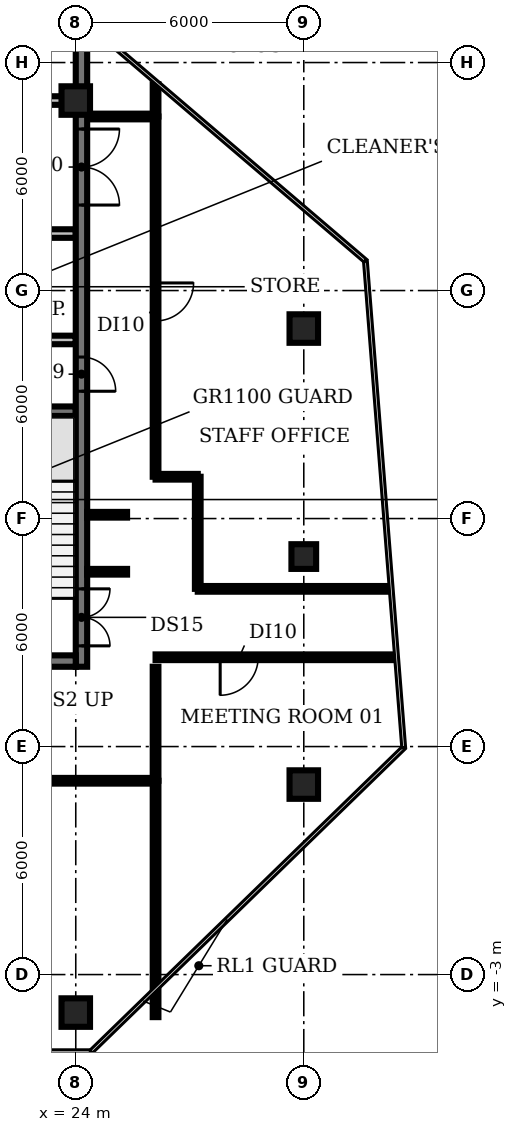
"""IFC4 building model, lengths in metres.
Left out: names, types, materials, properties, quantities, classifications, styles, units other than length and angle.
Written with IfcOpenShell. Run it as: python <this file> out.ifc"""

import sys

from ifc_helpers import new_model, si_unit, direction, frame, frame_2d, origin, origin_2d, place, context, subcontext, project, spatial, rectangle, circle, extrude, element, fill, save


model = new_model("IFC4")
c1 = context("Model", 3, precision=1e-05, world=origin(), true_north=direction((0.0, 1.0)))
c2 = subcontext(c1, "Body", "Model", "MODEL_VIEW")
j1 = project(units=[si_unit("LENGTHUNIT", "METRE"), si_unit("PLANEANGLEUNIT", "RADIAN")], contexts=[c1])
p1 = place(None, origin())
s1 = spatial("IfcSite", under=j1, at=p1, CompositionType="ELEMENT")
p2 = place(p1, origin())
s2 = spatial("IfcBuilding", under=s1, at=p2, CompositionType="ELEMENT")
p3 = place(p2, frame((0.0, 0.0, 314.6)))
s3 = spatial("IfcBuildingStorey", under=s2, at=p3, CompositionType="ELEMENT", Elevation=314.6)
for number, where, z_axis, x_axis in (
    (1, (24.0, -4.0, 0.0), (0.0, 0.0, 1.0), (1.0, 0.0, 0.0)),
    (2, (24.0, 20.0, 0.0), (0.0, 0.0, 1.0), (1.0, 0.0, 0.0)),
    (3, (30.0, 2.0, 0.0), (0.0, 0.0, 1.0), (1.0, 0.0, 0.0)),
):
    element("IfcColumn", number, at=place(p3, frame(where, z_axis=z_axis, x_axis=x_axis)), inside=s3, PredefinedType="COLUMN", context=c2, shape_type="SweptSolid", body=[
        extrude(circle(Radius=0.375, at=origin_2d()), origin(), (0.0, 0.0, 1.0), 3.9),
    ])
p4 = place(p3, frame((30.0, 8.0, 0.0), z_axis=(0.0, 0.0, 1.0), x_axis=(1.0, 0.0, 0.0)))
e4 = element("IfcColumn", 4, at=p4, inside=s3, PredefinedType="COLUMN", context=c2, shape_type="SweptSolid", body=[
    extrude(rectangle(XDim=0.65, YDim=0.65, at=origin_2d()), origin(), (0.0, 0.0, 1.0), 3.9),
])
p5 = place(p3, frame((30.0, 14.0, 0.0), z_axis=(0.0, 0.0, 1.0), x_axis=(1.0, 0.0, 0.0)))
e5 = element("IfcColumn", 5, at=p5, inside=s3, PredefinedType="COLUMN", context=c2, shape_type="SweptSolid", body=[
    extrude(circle(Radius=0.375, at=origin_2d()), origin(), (0.0, 0.0, 1.0), 3.9),
])
p6 = place(p3, frame((20.85, 11.825, 0.0), z_axis=(0.0, 0.0, 1.0), x_axis=(1.0, 0.0, 0.0)))
e6 = element("IfcWall", 6, at=p6, inside=s3, PredefinedType="SHEAR", context=c2, shape_type="SweptSolid", body=[
    extrude(rectangle(XDim=3.15, YDim=0.25, at=frame_2d((1.575, 0.0))), origin(), (0.0, 0.0, 1.0), 3.9),
])
p7 = place(p3, frame((16.6, 13.7, 0.0), z_axis=(0.0, 0.0, 1.0), x_axis=(1.0, 0.0, 0.0)))
e7 = element("IfcWall", 7, at=p7, inside=s3, PredefinedType="PARTITIONING", context=c2, shape_type="SweptSolid", body=[
    extrude(rectangle(XDim=7.4, YDim=0.225, at=frame_2d((3.7, 0.0))), origin(), (0.0, 0.0, 1.0), 3.9),
])
p8 = place(p3, frame((9.4, 16.5, 0.0), z_axis=(0.0, 0.0, 1.0), x_axis=(1.0, 0.0, 0.0)))
e8 = element("IfcWall", 8, at=p8, inside=s3, PredefinedType="PARTITIONING", context=c2, shape_type="SweptSolid", body=[
    extrude(rectangle(XDim=14.6, YDim=0.225, at=frame_2d((7.3, 0.0))), origin(), (0.0, 0.0, 1.0), 3.9),
])
p9 = place(p8, frame((1.6, 0.0, 0.0)))
e9 = element("IfcOpeningElement", 9, at=p9, cuts=e8, PredefinedType="OPENING", context=c2, shape_type="SweptSolid", body=[
    extrude(rectangle(XDim=1.0, YDim=2.1, at=frame_2d((0.5, 1.05))), frame((0.0, 0.123, 0.0), z_axis=(0.0, -1.0, 0.0), x_axis=(1.0, 0.0, 0.0)), (0.0, 0.0, 1.0), 0.245),
])
p10 = place(p8, frame((5.125, 0.0, 0.0)))
e10 = element("IfcOpeningElement", 10, at=p10, cuts=e8, PredefinedType="OPENING", context=c2, shape_type="SweptSolid", body=[
    extrude(rectangle(XDim=0.9, YDim=2.1, at=frame_2d((0.45, 1.05))), frame((0.0, 0.123, 0.0), z_axis=(0.0, -1.0, 0.0), x_axis=(1.0, 0.0, 0.0)), (0.0, 0.0, 1.0), 0.245),
])
p11 = place(p8, frame((7.675, 0.0, 0.0)))
e11 = element("IfcOpeningElement", 11, at=p11, cuts=e8, PredefinedType="OPENING", context=c2, shape_type="SweptSolid", body=[
    extrude(rectangle(XDim=0.9, YDim=2.1, at=frame_2d((0.45, 1.05))), frame((0.0, 0.123, 0.0), z_axis=(0.0, -1.0, 0.0), x_axis=(1.0, 0.0, 0.0)), (0.0, 0.0, 1.0), 0.245),
])
p12 = place(p8, frame((9.775, 0.0, 0.0)))
e12 = element("IfcOpeningElement", 12, at=p12, cuts=e8, PredefinedType="OPENING", context=c2, shape_type="SweptSolid", body=[
    extrude(rectangle(XDim=0.9, YDim=2.1, at=frame_2d((0.45, 1.05))), frame((0.0, 0.123, 0.0), z_axis=(0.0, -1.0, 0.0), x_axis=(1.0, 0.0, 0.0)), (0.0, 0.0, 1.0), 0.245),
])
p13 = place(p8, frame((12.4, 0.0, 0.0)))
e13 = element("IfcOpeningElement", 13, at=p13, cuts=e8, PredefinedType="OPENING", context=c2, shape_type="SweptSolid", body=[
    extrude(rectangle(XDim=1.0, YDim=2.1, at=frame_2d((0.5, 1.05))), frame((0.0, 0.123, 0.0), z_axis=(0.0, -1.0, 0.0), x_axis=(1.0, 0.0, 0.0)), (0.0, 0.0, 1.0), 0.245),
])
p14 = place(p3, frame((24.0, 20.0, 0.0), z_axis=(0.0, 0.0, 1.0), x_axis=(-1.0, 0.0, 0.0)))
e14 = element("IfcWall", 14, at=p14, inside=s3, PredefinedType="PARTITIONING", context=c2, shape_type="SweptSolid", body=[
    extrude(rectangle(XDim=14.6, YDim=0.225, at=frame_2d((7.3, 0.0))), origin(), (0.0, 0.0, 1.0), 3.9),
])
p15 = place(p14, frame((12.75, 0.0, 0.0)))
e15 = element("IfcOpeningElement", 15, at=p15, cuts=e14, PredefinedType="OPENING", context=c2, shape_type="SweptSolid", body=[
    extrude(rectangle(XDim=1.1, YDim=2.1, at=frame_2d((0.55, 1.05))), frame((0.0, 0.123, 0.0), z_axis=(0.0, -1.0, 0.0), x_axis=(1.0, 0.0, 0.0)), (0.0, 0.0, 1.0), 0.245),
])
p16 = place(p14, frame((9.95, 0.0, 0.0)))
e16 = element("IfcOpeningElement", 16, at=p16, cuts=e14, PredefinedType="OPENING", context=c2, shape_type="SweptSolid", body=[
    extrude(rectangle(XDim=1.1, YDim=2.1, at=frame_2d((0.55, 1.05))), frame((0.0, 0.123, 0.0), z_axis=(0.0, -1.0, 0.0), x_axis=(1.0, 0.0, 0.0)), (0.0, 0.0, 1.0), 0.245),
])
p17 = place(p14, frame((7.15, 0.0, 0.0)))
e17 = element("IfcOpeningElement", 17, at=p17, cuts=e14, PredefinedType="OPENING", context=c2, shape_type="SweptSolid", body=[
    extrude(rectangle(XDim=1.1, YDim=2.1, at=frame_2d((0.55, 1.05))), frame((0.0, 0.123, 0.0), z_axis=(0.0, -1.0, 0.0), x_axis=(1.0, 0.0, 0.0)), (0.0, 0.0, 1.0), 0.245),
])
p18 = place(p14, frame((4.35, 0.0, 0.0)))
e18 = element("IfcOpeningElement", 18, at=p18, cuts=e14, PredefinedType="OPENING", context=c2, shape_type="SweptSolid", body=[
    extrude(rectangle(XDim=1.1, YDim=2.1, at=frame_2d((0.55, 1.05))), frame((0.0, 0.123, 0.0), z_axis=(0.0, -1.0, 0.0), x_axis=(1.0, 0.0, 0.0)), (0.0, 0.0, 1.0), 0.245),
])
p19 = place(p14, frame((1.2, 0.0, 0.0)))
e19 = element("IfcOpeningElement", 19, at=p19, cuts=e14, PredefinedType="OPENING", context=c2, shape_type="SweptSolid", body=[
    extrude(rectangle(XDim=1.0, YDim=2.1, at=frame_2d((0.5, 1.05))), frame((0.0, 0.123, 0.0), z_axis=(0.0, -1.0, 0.0), x_axis=(1.0, 0.0, 0.0)), (0.0, 0.0, 1.0), 0.245),
])
p20 = place(p3, frame((24.15, 25.705, 0.0), z_axis=(0.0, 0.0, 1.0), x_axis=(0.0, -1.0, 0.0)))
e20 = element("IfcWall", 20, at=p20, inside=s3, PredefinedType="SHEAR", context=c2, shape_type="SweptSolid", body=[
    extrude(rectangle(XDim=20.605, YDim=0.3, at=frame_2d((10.302, 0.0))), origin(), (0.0, 0.0, 1.0), 3.9),
])
p21 = place(p20, frame((18.555, 0.0, 0.0)))
e21 = element("IfcOpeningElement", 21, at=p21, cuts=e20, PredefinedType="OPENING", context=c2, shape_type="SweptSolid", body=[
    extrude(rectangle(XDim=1.5, YDim=2.1, at=frame_2d((0.75, 1.05))), frame((0.0, 0.16, 0.0), z_axis=(0.0, -1.0, 0.0), x_axis=(1.0, 0.0, 0.0)), (0.0, 0.0, 1.0), 0.32),
])
p22 = place(p20, frame((12.455, 0.0, 0.0)))
e22 = element("IfcOpeningElement", 22, at=p22, cuts=e20, PredefinedType="OPENING", context=c2, shape_type="SweptSolid", body=[
    extrude(rectangle(XDim=0.9, YDim=2.1, at=frame_2d((0.45, 1.05))), frame((0.0, 0.16, 0.0), z_axis=(0.0, -1.0, 0.0), x_axis=(1.0, 0.0, 0.0)), (0.0, 0.0, 1.0), 0.32),
])
p23 = place(p20, frame((6.455, 0.0, 0.0)))
e23 = element("IfcOpeningElement", 23, at=p23, cuts=e20, PredefinedType="OPENING", context=c2, shape_type="SweptSolid", body=[
    extrude(rectangle(XDim=2.0, YDim=2.1, at=frame_2d((1.0, 1.05))), frame((0.0, 0.16, 0.0), z_axis=(0.0, -1.0, 0.0), x_axis=(1.0, 0.0, 0.0)), (0.0, 0.0, 1.0), 0.32),
])
p24 = place(p3, frame((24.0, 5.25, 0.0), z_axis=(0.0, 0.0, 1.0), x_axis=(-1.0, 0.0, 0.0)))
e24 = element("IfcWall", 24, at=p24, inside=s3, PredefinedType="SHEAR", context=c2, shape_type="SweptSolid", body=[
    extrude(rectangle(XDim=18.0, YDim=0.3, at=frame_2d((9.0, 0.0))), origin(), (0.0, 0.0, 1.0), 3.9),
])
p25 = place(p24, frame((13.0, 0.0, 0.0)))
e25 = element("IfcOpeningElement", 25, at=p25, cuts=e24, PredefinedType="OPENING", context=c2, shape_type="SweptSolid", body=[
    extrude(rectangle(XDim=1.2, YDim=2.1, at=frame_2d((0.6, 1.05))), frame((0.0, 0.16, 0.0), z_axis=(0.0, -1.0, 0.0), x_axis=(1.0, 0.0, 0.0)), (0.0, 0.0, 1.0), 0.32),
])
p26 = place(p24, frame((4.9, 0.0, 0.0)))
e26 = element("IfcOpeningElement", 26, at=p26, cuts=e24, PredefinedType="OPENING", context=c2, shape_type="SweptSolid", body=[
    extrude(rectangle(XDim=1.0, YDim=2.1, at=frame_2d((0.5, 1.05))), frame((0.0, 0.16, 0.0), z_axis=(0.0, -1.0, 0.0), x_axis=(1.0, 0.0, 0.0)), (0.0, 0.0, 1.0), 0.32),
])
for number, where, z_axis, x_axis in (
    (27, (24.3, 7.6, 0.0), (0.0, 0.0, 1.0), (1.0, 0.0, 0.0)),
    (28, (24.3, 9.1, 0.0), (0.0, 0.0, 1.0), (1.0, 0.0, 0.0)),
):
    element("IfcWall", number, at=place(p3, frame(where, z_axis=z_axis, x_axis=x_axis)), inside=s3, PredefinedType="PARTITIONING", context=c2, shape_type="SweptSolid", body=[
        extrude(rectangle(XDim=1.05, YDim=0.15, at=frame_2d((0.525, 0.0))), origin(), (0.0, 0.0, 1.0), 2.95),
    ])
p27 = place(p3, frame((24.4, 19.58, 0.0), z_axis=(0.0, 0.0, 1.0), x_axis=(1.0, 0.0, 0.0)))
e29 = element("IfcWall", 29, at=p27, inside=s3, PredefinedType="PARTITIONING", context=c2, shape_type="SweptSolid", body=[
    extrude(rectangle(XDim=1.7, YDim=0.15, at=frame_2d((0.85, 0.0))), origin(), (0.0, 0.0, 1.0), 2.95),
])
p28 = place(p3, frame((26.1, -4.12, 0.0), z_axis=(0.0, 0.0, 1.0), x_axis=(0.0, 1.0, 0.0)))
e30 = element("IfcWall", 30, at=p28, inside=s3, PredefinedType="PARTITIONING", context=c2, shape_type="SweptSolid", body=[
    extrude(rectangle(XDim=6.22, YDim=0.15, at=frame_2d((3.11, 0.0))), origin(), (0.0, 0.0, 1.0), 2.95),
])
p29 = place(p3, frame((26.1, 2.1, 0.0), z_axis=(0.0, 0.0, 1.0), x_axis=(-1.0, 0.0, 0.0)))
e31 = element("IfcWall", 31, at=p29, inside=s3, PredefinedType="PARTITIONING", context=c2, shape_type="SweptSolid", body=[
    extrude(rectangle(XDim=22.2, YDim=0.15, at=frame_2d((11.1, 0.0))), origin(), (0.0, 0.0, 1.0), 2.95),
])
p30 = place(p29, frame((10.6, 0.0, 0.0)))
e32 = element("IfcOpeningElement", 32, at=p30, cuts=e31, PredefinedType="OPENING", context=c2, shape_type="SweptSolid", body=[
    extrude(rectangle(XDim=1.2, YDim=2.1, at=frame_2d((0.6, 1.05))), frame((0.0, 0.085, 0.0), z_axis=(0.0, -1.0, 0.0), x_axis=(1.0, 0.0, 0.0)), (0.0, 0.0, 1.0), 0.17),
])
p31 = place(p3, frame((26.1, 2.1, 0.0), z_axis=(0.0, 0.0, 1.0), x_axis=(0.0, 1.0, 0.0)))
e33 = element("IfcWall", 33, at=p31, inside=s3, PredefinedType="PARTITIONING", context=c2, shape_type="SweptSolid", body=[
    extrude(rectangle(XDim=3.0, YDim=0.15, at=frame_2d((1.5, 0.0))), origin(), (0.0, 0.0, 1.0), 2.95),
])
p32 = place(p3, frame((26.1, 10.1, 0.0), z_axis=(0.0, 0.0, 1.0), x_axis=(1.0, 0.0, 0.0)))
e34 = element("IfcWall", 34, at=p32, inside=s3, PredefinedType="PARTITIONING", context=c2, shape_type="SweptSolid", body=[
    extrude(rectangle(XDim=1.11, YDim=0.15, at=frame_2d((0.555, 0.0))), origin(), (0.0, 0.0, 1.0), 2.95),
])
p33 = place(p3, frame((26.1, 19.58, 0.0), z_axis=(0.0, 0.0, 1.0), x_axis=(0.0, -1.0, 0.0)))
e35 = element("IfcWall", 35, at=p33, inside=s3, PredefinedType="PARTITIONING", context=c2, shape_type="SweptSolid", body=[
    extrude(rectangle(XDim=9.48, YDim=0.15, at=frame_2d((4.74, 0.0))), origin(), (0.0, 0.0, 1.0), 2.95),
])
p34 = place(p33, frame((4.38, 0.0, 0.0)))
e36 = element("IfcOpeningElement", 36, at=p34, cuts=e35, PredefinedType="OPENING", context=c2, shape_type="SweptSolid", body=[
    extrude(rectangle(XDim=1.0, YDim=2.1, at=frame_2d((0.5, 1.05))), frame((0.0, 0.085, 0.0), z_axis=(0.0, -1.0, 0.0), x_axis=(1.0, 0.0, 0.0)), (0.0, 0.0, 1.0), 0.17),
])
p35 = place(p3, frame((26.1, 19.58, 0.0), z_axis=(0.0, 0.0, 1.0), x_axis=(0.0, 1.0, 0.0)))
e37 = element("IfcWall", 37, at=p35, inside=s3, PredefinedType="PARTITIONING", context=c2, shape_type="SweptSolid", body=[
    extrude(rectangle(XDim=0.85, YDim=0.15, at=frame_2d((0.425, 0.0))), origin(), (0.0, 0.0, 1.0), 2.95),
])
p36 = place(p3, frame((27.21, 7.15, 0.0), z_axis=(0.0, 0.0, 1.0), x_axis=(0.0, 1.0, 0.0)))
e38 = element("IfcWall", 38, at=p36, inside=s3, PredefinedType="PARTITIONING", context=c2, shape_type="SweptSolid", body=[
    extrude(rectangle(XDim=2.95, YDim=0.15, at=frame_2d((1.475, 0.0))), origin(), (0.0, 0.0, 1.0), 2.95),
])
p37 = place(p3, frame((27.21, 7.15, 0.0), z_axis=(0.0, 0.0, 1.0), x_axis=(1.0, 0.0, 0.0)))
e39 = element("IfcWall", 39, at=p37, inside=s3, PredefinedType="PARTITIONING", context=c2, shape_type="SweptSolid", body=[
    extrude(rectangle(XDim=5.04, YDim=0.15, at=frame_2d((2.52, 0.0))), origin(), (0.0, 0.0, 1.0), 2.95),
])
p38 = place(p3, frame((32.39, 5.35, 0.0), z_axis=(0.0, 0.0, 1.0), x_axis=(-1.0, 0.0, 0.0)))
e40 = element("IfcWall", 40, at=p38, inside=s3, PredefinedType="PARTITIONING", context=c2, shape_type="SweptSolid", body=[
    extrude(rectangle(XDim=6.29, YDim=0.15, at=frame_2d((3.145, 0.0))), origin(), (0.0, 0.0, 1.0), 2.95),
])
p39 = place(p38, frame((3.59, 0.0, 0.0)))
e41 = element("IfcOpeningElement", 41, at=p39, cuts=e40, PredefinedType="OPENING", context=c2, shape_type="SweptSolid", body=[
    extrude(rectangle(XDim=1.0, YDim=2.1, at=frame_2d((0.5, 1.05))), frame((0.0, 0.085, 0.0), z_axis=(0.0, -1.0, 0.0), x_axis=(1.0, 0.0, 0.0)), (0.0, 0.0, 1.0), 0.17),
])
p40 = place(p21, origin())
e42 = element("IfcDoor", 42, at=p40, inside=s3, OperationType="DOUBLE_DOOR_SINGLE_SWING", PredefinedType="DOOR", context=c2, shape_type="SweptSolid", body=[
    extrude(rectangle(XDim=1.5, YDim=2.1, at=frame_2d((0.75, 1.05))), frame((0.0, 0.025, 0.0), z_axis=(0.0, -1.0, 0.0), x_axis=(1.0, 0.0, 0.0)), (0.0, 0.0, 1.0), 0.05),
])
fill(e21, e42)
p41 = place(p22, origin())
e43 = element("IfcDoor", 43, at=p41, inside=s3, OperationType="SINGLE_SWING_RIGHT", PredefinedType="DOOR", context=c2, shape_type="SweptSolid", body=[
    extrude(rectangle(XDim=0.9, YDim=2.1, at=frame_2d((0.45, 1.05))), frame((0.0, 0.025, 0.0), z_axis=(0.0, -1.0, 0.0), x_axis=(1.0, 0.0, 0.0)), (0.0, 0.0, 1.0), 0.05),
])
fill(e22, e43)
p42 = place(p23, origin())
e44 = element("IfcDoor", 44, at=p42, inside=s3, OperationType="DOUBLE_DOOR_SINGLE_SWING", PredefinedType="DOOR", context=c2, shape_type="SweptSolid", body=[
    extrude(rectangle(XDim=2.0, YDim=2.1, at=frame_2d((1.0, 1.05))), frame((0.0, 0.025, 0.0), z_axis=(0.0, -1.0, 0.0), x_axis=(1.0, 0.0, 0.0)), (0.0, 0.0, 1.0), 0.05),
])
fill(e23, e44)
p43 = place(p34, origin())
e45 = element("IfcDoor", 45, at=p43, inside=s3, OperationType="SINGLE_SWING_LEFT", PredefinedType="DOOR", context=c2, shape_type="SweptSolid", body=[
    extrude(rectangle(XDim=1.0, YDim=2.1, at=frame_2d((0.5, 1.05))), frame((0.0, 0.025, 0.0), z_axis=(0.0, -1.0, 0.0), x_axis=(1.0, 0.0, 0.0)), (0.0, 0.0, 1.0), 0.05),
])
fill(e36, e45)
p44 = place(p39, origin())
e46 = element("IfcDoor", 46, at=p44, inside=s3, OperationType="SINGLE_SWING_RIGHT", PredefinedType="DOOR", context=c2, shape_type="SweptSolid", body=[
    extrude(rectangle(XDim=1.0, YDim=2.1, at=frame_2d((0.5, 1.05))), frame((0.0, 0.025, 0.0), z_axis=(0.0, -1.0, 0.0), x_axis=(1.0, 0.0, 0.0)), (0.0, 0.0, 1.0), 0.05),
])
fill(e41, e46)
save(model, sys.argv[1])
